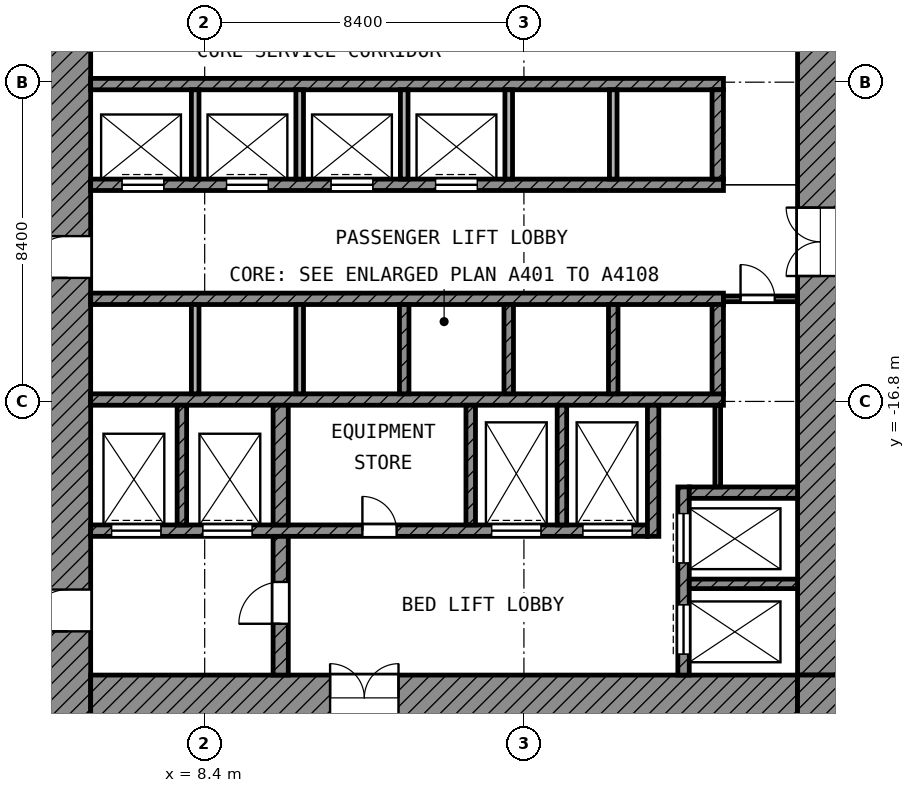
"""IFC4 building model, lengths in metres.
Left out: names, types, materials, properties, quantities, classifications, styles, units other than length and angle.
Written with IfcOpenShell. Run it as: python <this file> out.ifc"""

import sys

from ifc_helpers import new_model, si_unit, direction, frame, frame_2d, origin, place, context, subcontext, project, spatial, rectangle, extrude, element, fill, save


model = new_model("IFC4")
c1 = context("Model", 3, precision=1e-05, world=origin(), true_north=direction((0.0, 1.0)))
c2 = subcontext(c1, "Body", "Model", "MODEL_VIEW")
j1 = project(units=[si_unit("LENGTHUNIT", "METRE"), si_unit("PLANEANGLEUNIT", "RADIAN")], contexts=[c1])
p1 = place(None, origin())
s1 = spatial("IfcSite", under=j1, at=p1, CompositionType="ELEMENT")
p2 = place(p1, origin())
s2 = spatial("IfcBuilding", under=s1, at=p2, CompositionType="ELEMENT")
p3 = place(p2, frame((0.0, 0.0, 12.6)))
s3 = spatial("IfcBuildingStorey", under=s2, at=p3, CompositionType="ELEMENT", Elevation=12.6)
p4 = place(p3, frame((4.8, -25.2, 0.0), z_axis=(0.0, 0.0, 1.0), x_axis=(0.0, 1.0, 0.0)))
e1 = element("IfcWall", 1, at=p4, inside=s3, PredefinedType="SHEAR", context=c2, shape_type="SweptSolid", body=[
    extrude(rectangle(XDim=19.8, YDim=1.2, at=frame_2d((9.9, 0.0))), origin(), (0.0, 0.0, 1.0), 5.25),
])
p5 = place(p4, frame((11.65, 0.0, 0.0)))
e2 = element("IfcOpeningElement", 2, at=p5, cuts=e1, PredefinedType="OPENING", context=c2, shape_type="SweptSolid", body=[
    extrude(rectangle(XDim=1.1, YDim=2.1, at=frame_2d((0.55, 1.05))), frame((0.0, 0.61, 0.0), z_axis=(0.0, -1.0, 0.0), x_axis=(1.0, 0.0, 0.0)), (0.0, 0.0, 1.0), 1.22),
])
p6 = place(p4, frame((2.35, 0.0, 0.0)))
e3 = element("IfcOpeningElement", 3, at=p6, cuts=e1, PredefinedType="OPENING", context=c2, shape_type="SweptSolid", body=[
    extrude(rectangle(XDim=1.1, YDim=2.1, at=frame_2d((0.55, 1.05))), frame((0.0, 0.61, 0.0), z_axis=(0.0, -1.0, 0.0), x_axis=(1.0, 0.0, 0.0)), (0.0, 0.0, 1.0), 1.22),
])
p7 = place(p3, frame((24.6, -24.0, 0.0), z_axis=(0.0, 0.0, 1.0), x_axis=(0.0, 1.0, 0.0)))
e4 = element("IfcWall", 4, at=p7, inside=s3, PredefinedType="SHEAR", context=c2, shape_type="SweptSolid", body=[
    extrude(rectangle(XDim=18.6, YDim=1.2, at=frame_2d((9.3, 0.0))), origin(), (0.0, 0.0, 1.0), 5.25),
])
p8 = place(p7, frame((10.5, 0.0, 0.0)))
e5 = element("IfcOpeningElement", 5, at=p8, cuts=e4, PredefinedType="OPENING", context=c2, shape_type="SweptSolid", body=[
    extrude(rectangle(XDim=1.8, YDim=2.1, at=frame_2d((0.9, 1.05))), frame((0.0, 0.61, 0.0), z_axis=(0.0, -1.0, 0.0), x_axis=(1.0, 0.0, 0.0)), (0.0, 0.0, 1.0), 1.22),
])
p9 = place(p3, frame((5.4, -24.6, 0.0), z_axis=(0.0, 0.0, 1.0), x_axis=(1.0, 0.0, 0.0)))
e6 = element("IfcWall", 6, at=p9, inside=s3, PredefinedType="SHEAR", context=c2, shape_type="SweptSolid", body=[
    extrude(rectangle(XDim=18.6, YDim=1.2, at=frame_2d((9.3, 0.0))), origin(), (0.0, 0.0, 1.0), 5.25),
])
p10 = place(p9, frame((6.3, 0.0, 0.0)))
e7 = element("IfcOpeningElement", 7, at=p10, cuts=e6, PredefinedType="OPENING", context=c2, shape_type="SweptSolid", body=[
    extrude(rectangle(XDim=1.8, YDim=2.1, at=frame_2d((0.9, 1.05))), frame((0.0, 0.61, 0.0), z_axis=(0.0, -1.0, 0.0), x_axis=(1.0, 0.0, 0.0)), (0.0, 0.0, 1.0), 1.22),
])
p11 = place(p3, frame((24.6, -25.2, 0.0), z_axis=(0.0, 0.0, 1.0), x_axis=(0.0, 1.0, 0.0)))
e8 = element("IfcWall", 8, at=p11, inside=s3, PredefinedType="SHEAR", context=c2, shape_type="SweptSolid", body=[
    extrude(rectangle(XDim=1.2, YDim=1.2, at=frame_2d((0.6, 0.0))), origin(), (0.0, 0.0, 1.0), 5.25),
])
p12 = place(p3, frame((5.4, -8.45, 0.0), z_axis=(0.0, 0.0, 1.0), x_axis=(1.0, 0.0, 0.0)))
e9 = element("IfcWall", 9, at=p12, inside=s3, PredefinedType="SHEAR", context=c2, shape_type="SweptSolid", body=[
    extrude(rectangle(XDim=16.65, YDim=0.3, at=frame_2d((8.325, 0.0))), origin(), (0.0, 0.0, 1.0), 5.25),
])
p13 = place(p3, frame((5.4, -11.1, 0.0), z_axis=(0.0, 0.0, 1.0), x_axis=(1.0, 0.0, 0.0)))
e10 = element("IfcWall", 10, at=p13, inside=s3, PredefinedType="SHEAR", context=c2, shape_type="SweptSolid", body=[
    extrude(rectangle(XDim=16.65, YDim=0.3, at=frame_2d((8.325, 0.0))), origin(), (0.0, 0.0, 1.0), 5.25),
])
p14 = place(p13, frame((0.825, 0.0, 0.0)))
e11 = element("IfcOpeningElement", 11, at=p14, cuts=e10, PredefinedType="OPENING", context=c2, shape_type="SweptSolid", body=[
    extrude(rectangle(XDim=1.1, YDim=2.1, at=frame_2d((0.55, 1.05))), frame((0.0, 0.16, 0.0), z_axis=(0.0, -1.0, 0.0), x_axis=(1.0, 0.0, 0.0)), (0.0, 0.0, 1.0), 0.32),
])
p15 = place(p13, frame((3.575, 0.0, 0.0)))
e12 = element("IfcOpeningElement", 12, at=p15, cuts=e10, PredefinedType="OPENING", context=c2, shape_type="SweptSolid", body=[
    extrude(rectangle(XDim=1.1, YDim=2.1, at=frame_2d((0.55, 1.05))), frame((0.0, 0.16, 0.0), z_axis=(0.0, -1.0, 0.0), x_axis=(1.0, 0.0, 0.0)), (0.0, 0.0, 1.0), 0.32),
])
p16 = place(p13, frame((6.325, 0.0, 0.0)))
e13 = element("IfcOpeningElement", 13, at=p16, cuts=e10, PredefinedType="OPENING", context=c2, shape_type="SweptSolid", body=[
    extrude(rectangle(XDim=1.1, YDim=2.1, at=frame_2d((0.55, 1.05))), frame((0.0, 0.16, 0.0), z_axis=(0.0, -1.0, 0.0), x_axis=(1.0, 0.0, 0.0)), (0.0, 0.0, 1.0), 0.32),
])
p17 = place(p13, frame((9.075, 0.0, 0.0)))
e14 = element("IfcOpeningElement", 14, at=p17, cuts=e10, PredefinedType="OPENING", context=c2, shape_type="SweptSolid", body=[
    extrude(rectangle(XDim=1.1, YDim=2.1, at=frame_2d((0.55, 1.05))), frame((0.0, 0.16, 0.0), z_axis=(0.0, -1.0, 0.0), x_axis=(1.0, 0.0, 0.0)), (0.0, 0.0, 1.0), 0.32),
])
for number, where, z_axis, x_axis in (
    (15, (5.4, -14.1, 0.0), (0.0, 0.0, 1.0), (1.0, 0.0, 0.0)),
    (16, (5.4, -16.75, 0.0), (0.0, 0.0, 1.0), (1.0, 0.0, 0.0)),
):
    element("IfcWall", number, at=place(p3, frame(where, z_axis=z_axis, x_axis=x_axis)), inside=s3, PredefinedType="SHEAR", context=c2, shape_type="SweptSolid", body=[
        extrude(rectangle(XDim=16.65, YDim=0.3, at=frame_2d((8.325, 0.0))), origin(), (0.0, 0.0, 1.0), 5.25),
    ])
p18 = place(p3, frame((5.4, -20.2, 0.0), z_axis=(0.0, 0.0, 1.0), x_axis=(1.0, 0.0, 0.0)))
e17 = element("IfcWall", 17, at=p18, inside=s3, PredefinedType="SHEAR", context=c2, shape_type="SweptSolid", body=[
    extrude(rectangle(XDim=14.65, YDim=0.3, at=frame_2d((7.325, 0.0))), origin(), (0.0, 0.0, 1.0), 5.25),
])
p19 = place(p18, frame((10.55, 0.0, 0.0)))
e18 = element("IfcOpeningElement", 18, at=p19, cuts=e17, PredefinedType="OPENING", context=c2, shape_type="SweptSolid", body=[
    extrude(rectangle(XDim=1.3, YDim=2.1, at=frame_2d((0.65, 1.05))), frame((0.0, 0.16, 0.0), z_axis=(0.0, -1.0, 0.0), x_axis=(1.0, 0.0, 0.0)), (0.0, 0.0, 1.0), 0.32),
])
p20 = place(p18, frame((12.95, 0.0, 0.0)))
e19 = element("IfcOpeningElement", 19, at=p20, cuts=e17, PredefinedType="OPENING", context=c2, shape_type="SweptSolid", body=[
    extrude(rectangle(XDim=1.3, YDim=2.1, at=frame_2d((0.65, 1.05))), frame((0.0, 0.16, 0.0), z_axis=(0.0, -1.0, 0.0), x_axis=(1.0, 0.0, 0.0)), (0.0, 0.0, 1.0), 0.32),
])
p21 = place(p18, frame((0.55, 0.0, 0.0)))
e20 = element("IfcOpeningElement", 20, at=p21, cuts=e17, PredefinedType="OPENING", context=c2, shape_type="SweptSolid", body=[
    extrude(rectangle(XDim=1.3, YDim=2.1, at=frame_2d((0.65, 1.05))), frame((0.0, 0.16, 0.0), z_axis=(0.0, -1.0, 0.0), x_axis=(1.0, 0.0, 0.0)), (0.0, 0.0, 1.0), 0.32),
])
p22 = place(p18, frame((2.95, 0.0, 0.0)))
e21 = element("IfcOpeningElement", 21, at=p22, cuts=e17, PredefinedType="OPENING", context=c2, shape_type="SweptSolid", body=[
    extrude(rectangle(XDim=1.3, YDim=2.1, at=frame_2d((0.65, 1.05))), frame((0.0, 0.16, 0.0), z_axis=(0.0, -1.0, 0.0), x_axis=(1.0, 0.0, 0.0)), (0.0, 0.0, 1.0), 0.32),
])
p23 = place(p18, frame((7.15, 0.0, 0.0)))
e22 = element("IfcOpeningElement", 22, at=p23, cuts=e17, PredefinedType="OPENING", context=c2, shape_type="SweptSolid", body=[
    extrude(rectangle(XDim=0.9, YDim=2.1, at=frame_2d((0.45, 1.05))), frame((0.0, 0.16, 0.0), z_axis=(0.0, -1.0, 0.0), x_axis=(1.0, 0.0, 0.0)), (0.0, 0.0, 1.0), 0.32),
])
p24 = place(p3, frame((10.4, -24.0, 0.0), z_axis=(0.0, 0.0, 1.0), x_axis=(0.0, 1.0, 0.0)))
e23 = element("IfcWall", 23, at=p24, inside=s3, PredefinedType="SHEAR", context=c2, shape_type="SweptSolid", body=[
    extrude(rectangle(XDim=3.65, YDim=0.4, at=frame_2d((1.825, 0.0))), origin(), (0.0, 0.0, 1.0), 5.25),
])
p25 = place(p24, frame((1.35, 0.0, 0.0)))
e24 = element("IfcOpeningElement", 24, at=p25, cuts=e23, PredefinedType="OPENING", context=c2, shape_type="SweptSolid", body=[
    extrude(rectangle(XDim=1.1, YDim=2.1, at=frame_2d((0.55, 1.05))), frame((0.0, 0.21, 0.0), z_axis=(0.0, -1.0, 0.0), x_axis=(1.0, 0.0, 0.0)), (0.0, 0.0, 1.0), 0.42),
])
p26 = place(p3, frame((10.4, -20.05, 0.0), z_axis=(0.0, 0.0, 1.0), x_axis=(0.0, 1.0, 0.0)))
e25 = element("IfcWall", 25, at=p26, inside=s3, PredefinedType="SHEAR", context=c2, shape_type="SweptSolid", body=[
    extrude(rectangle(XDim=3.15, YDim=0.4, at=frame_2d((1.575, 0.0))), origin(), (0.0, 0.0, 1.0), 5.25),
])
p27 = place(p3, frame((20.2, -20.35, 0.0), z_axis=(0.0, 0.0, 1.0), x_axis=(0.0, 1.0, 0.0)))
e26 = element("IfcWall", 26, at=p27, inside=s3, PredefinedType="SHEAR", context=c2, shape_type="SweptSolid", body=[
    extrude(rectangle(XDim=3.45, YDim=0.3, at=frame_2d((1.725, 0.0))), origin(), (0.0, 0.0, 1.0), 5.25),
])
p28 = place(p3, frame((21.9, -10.95, 0.0), z_axis=(0.0, 0.0, 1.0), x_axis=(0.0, 1.0, 0.0)))
e27 = element("IfcWall", 27, at=p28, inside=s3, PredefinedType="SHEAR", context=c2, shape_type="SweptSolid", body=[
    extrude(rectangle(XDim=2.35, YDim=0.3, at=frame_2d((1.175, 0.0))), origin(), (0.0, 0.0, 1.0), 5.25),
])
p29 = place(p3, frame((21.9, -16.6, 0.0), z_axis=(0.0, 0.0, 1.0), x_axis=(0.0, 1.0, 0.0)))
e28 = element("IfcWall", 28, at=p29, inside=s3, PredefinedType="SHEAR", context=c2, shape_type="SweptSolid", body=[
    extrude(rectangle(XDim=2.35, YDim=0.3, at=frame_2d((1.175, 0.0))), origin(), (0.0, 0.0, 1.0), 5.25),
])
p30 = place(p3, frame((21.15, -19.2, 0.0), z_axis=(0.0, 0.0, 1.0), x_axis=(1.0, 0.0, 0.0)))
e29 = element("IfcWall", 29, at=p30, inside=s3, PredefinedType="SHEAR", context=c2, shape_type="SweptSolid", body=[
    extrude(rectangle(XDim=2.85, YDim=0.3, at=frame_2d((1.425, 0.0))), origin(), (0.0, 0.0, 1.0), 5.25),
])
p31 = place(p3, frame((21.0, -24.0, 0.0), z_axis=(0.0, 0.0, 1.0), x_axis=(0.0, 1.0, 0.0)))
e30 = element("IfcWall", 30, at=p31, inside=s3, PredefinedType="SHEAR", context=c2, shape_type="SweptSolid", body=[
    extrude(rectangle(XDim=4.95, YDim=0.3, at=frame_2d((2.475, 0.0))), origin(), (0.0, 0.0, 1.0), 5.25),
])
p32 = place(p31, frame((2.95, 0.0, 0.0)))
e31 = element("IfcOpeningElement", 31, at=p32, cuts=e30, PredefinedType="OPENING", context=c2, shape_type="SweptSolid", body=[
    extrude(rectangle(XDim=1.3, YDim=2.1, at=frame_2d((0.65, 1.05))), frame((0.0, 0.16, 0.0), z_axis=(0.0, -1.0, 0.0), x_axis=(1.0, 0.0, 0.0)), (0.0, 0.0, 1.0), 0.32),
])
p33 = place(p31, frame((0.55, 0.0, 0.0)))
e32 = element("IfcOpeningElement", 32, at=p33, cuts=e30, PredefinedType="OPENING", context=c2, shape_type="SweptSolid", body=[
    extrude(rectangle(XDim=1.3, YDim=2.1, at=frame_2d((0.65, 1.05))), frame((0.0, 0.16, 0.0), z_axis=(0.0, -1.0, 0.0), x_axis=(1.0, 0.0, 0.0)), (0.0, 0.0, 1.0), 0.32),
])
p34 = place(p3, frame((21.15, -21.6, 0.0), z_axis=(0.0, 0.0, 1.0), x_axis=(1.0, 0.0, 0.0)))
e33 = element("IfcWall", 33, at=p34, inside=s3, PredefinedType="SHEAR", context=c2, shape_type="SweptSolid", body=[
    extrude(rectangle(XDim=2.85, YDim=0.25, at=frame_2d((1.425, 0.0))), origin(), (0.0, 0.0, 1.0), 5.25),
])
for number, where, z_axis, x_axis in (
    (34, (7.8, -20.05, 0.0), (0.0, 0.0, 1.0), (0.0, 1.0, 0.0)),
    (35, (15.4, -20.05, 0.0), (0.0, 0.0, 1.0), (0.0, 1.0, 0.0)),
    (36, (17.8, -20.05, 0.0), (0.0, 0.0, 1.0), (0.0, 1.0, 0.0)),
):
    element("IfcWall", number, at=place(p3, frame(where, z_axis=z_axis, x_axis=x_axis)), inside=s3, PredefinedType="SHEAR", context=c2, shape_type="SweptSolid", body=[
        extrude(rectangle(XDim=3.15, YDim=0.25, at=frame_2d((1.575, 0.0))), origin(), (0.0, 0.0, 1.0), 5.25),
    ])
for number, where, z_axis, x_axis in (
    (37, (8.15, -10.95, 0.0), (0.0, 0.0, 1.0), (0.0, 1.0, 0.0)),
    (38, (10.9, -10.95, 0.0), (0.0, 0.0, 1.0), (0.0, 1.0, 0.0)),
    (39, (13.65, -10.95, 0.0), (0.0, 0.0, 1.0), (0.0, 1.0, 0.0)),
    (40, (16.4, -10.95, 0.0), (0.0, 0.0, 1.0), (0.0, 1.0, 0.0)),
    (41, (19.15, -10.95, 0.0), (0.0, 0.0, 1.0), (0.0, 1.0, 0.0)),
):
    element("IfcWall", number, at=place(p3, frame(where, z_axis=z_axis, x_axis=x_axis)), inside=s3, PredefinedType="PARTITIONING", context=c2, shape_type="SweptSolid", body=[
        extrude(rectangle(XDim=2.35, YDim=0.2, at=frame_2d((1.175, 0.0))), origin(), (0.0, 0.0, 1.0), 5.25),
    ])
for number, where, z_axis, x_axis in (
    (42, (8.15, -16.6, 0.0), (0.0, 0.0, 1.0), (0.0, 1.0, 0.0)),
    (43, (10.9, -16.6, 0.0), (0.0, 0.0, 1.0), (0.0, 1.0, 0.0)),
):
    element("IfcWall", number, at=place(p3, frame(where, z_axis=z_axis, x_axis=x_axis)), inside=s3, PredefinedType="PARTITIONING", context=c2, shape_type="SweptSolid", body=[
        extrude(rectangle(XDim=2.35, YDim=0.2, at=frame_2d((1.175, 0.0))), origin(), (0.0, 0.0, 1.0), 5.25),
    ])
for number, where, z_axis, x_axis in (
    (44, (13.65, -16.6, 0.0), (0.0, 0.0, 1.0), (0.0, 1.0, 0.0)),
    (45, (16.4, -16.6, 0.0), (0.0, 0.0, 1.0), (0.0, 1.0, 0.0)),
    (46, (19.15, -16.6, 0.0), (0.0, 0.0, 1.0), (0.0, 1.0, 0.0)),
):
    element("IfcWall", number, at=place(p3, frame(where, z_axis=z_axis, x_axis=x_axis)), inside=s3, PredefinedType="SHEAR", context=c2, shape_type="SweptSolid", body=[
        extrude(rectangle(XDim=2.35, YDim=0.25, at=frame_2d((1.175, 0.0))), origin(), (0.0, 0.0, 1.0), 5.25),
    ])
p35 = place(p3, frame((21.9, -19.05, 0.0), z_axis=(0.0, 0.0, 1.0), x_axis=(0.0, 1.0, 0.0)))
e47 = element("IfcWall", 47, at=p35, inside=s3, PredefinedType="PARTITIONING", context=c2, shape_type="SweptSolid", body=[
    extrude(rectangle(XDim=2.15, YDim=0.15, at=frame_2d((1.075, 0.0))), origin(), (0.0, 0.0, 1.0), 5.25),
])
p36 = place(p3, frame((22.05, -14.1, 0.0), z_axis=(0.0, 0.0, 1.0), x_axis=(1.0, 0.0, 0.0)))
e48 = element("IfcWall", 48, at=p36, inside=s3, PredefinedType="PARTITIONING", context=c2, shape_type="SweptSolid", body=[
    extrude(rectangle(XDim=1.95, YDim=0.15, at=frame_2d((0.975, 0.0))), origin(), (0.0, 0.0, 1.0), 5.25),
])
p37 = place(p36, frame((0.45, 0.0, 0.0)))
e49 = element("IfcOpeningElement", 49, at=p37, cuts=e48, PredefinedType="OPENING", context=c2, shape_type="SweptSolid", body=[
    extrude(rectangle(XDim=0.9, YDim=2.1, at=frame_2d((0.45, 1.05))), frame((0.0, 0.085, 0.0), z_axis=(0.0, -1.0, 0.0), x_axis=(1.0, 0.0, 0.0)), (0.0, 0.0, 1.0), 0.17),
])
p38 = place(p14, origin())
e50 = element("IfcDoor", 50, at=p38, inside=s3, OperationType="DOUBLE_DOOR_SLIDING", PredefinedType="DOOR", context=c2, shape_type="SweptSolid", body=[
    extrude(rectangle(XDim=1.1, YDim=2.1, at=frame_2d((0.55, 1.05))), frame((0.0, 0.025, 0.0), z_axis=(0.0, -1.0, 0.0), x_axis=(1.0, 0.0, 0.0)), (0.0, 0.0, 1.0), 0.05),
])
fill(e11, e50)
p39 = place(p15, origin())
e51 = element("IfcDoor", 51, at=p39, inside=s3, OperationType="DOUBLE_DOOR_SLIDING", PredefinedType="DOOR", context=c2, shape_type="SweptSolid", body=[
    extrude(rectangle(XDim=1.1, YDim=2.1, at=frame_2d((0.55, 1.05))), frame((0.0, 0.025, 0.0), z_axis=(0.0, -1.0, 0.0), x_axis=(1.0, 0.0, 0.0)), (0.0, 0.0, 1.0), 0.05),
])
fill(e12, e51)
p40 = place(p16, origin())
e52 = element("IfcDoor", 52, at=p40, inside=s3, OperationType="DOUBLE_DOOR_SLIDING", PredefinedType="DOOR", context=c2, shape_type="SweptSolid", body=[
    extrude(rectangle(XDim=1.1, YDim=2.1, at=frame_2d((0.55, 1.05))), frame((0.0, 0.025, 0.0), z_axis=(0.0, -1.0, 0.0), x_axis=(1.0, 0.0, 0.0)), (0.0, 0.0, 1.0), 0.05),
])
fill(e13, e52)
p41 = place(p17, origin())
e53 = element("IfcDoor", 53, at=p41, inside=s3, OperationType="DOUBLE_DOOR_SLIDING", PredefinedType="DOOR", context=c2, shape_type="SweptSolid", body=[
    extrude(rectangle(XDim=1.1, YDim=2.1, at=frame_2d((0.55, 1.05))), frame((0.0, 0.025, 0.0), z_axis=(0.0, -1.0, 0.0), x_axis=(1.0, 0.0, 0.0)), (0.0, 0.0, 1.0), 0.05),
])
fill(e14, e53)
p42 = place(p32, origin())
e54 = element("IfcDoor", 54, at=p42, inside=s3, OperationType="DOUBLE_DOOR_SLIDING", PredefinedType="DOOR", context=c2, shape_type="SweptSolid", body=[
    extrude(rectangle(XDim=1.3, YDim=2.1, at=frame_2d((0.65, 1.05))), frame((0.0, 0.025, 0.0), z_axis=(0.0, -1.0, 0.0), x_axis=(1.0, 0.0, 0.0)), (0.0, 0.0, 1.0), 0.05),
])
fill(e31, e54)
p43 = place(p33, origin())
e55 = element("IfcDoor", 55, at=p43, inside=s3, OperationType="DOUBLE_DOOR_SLIDING", PredefinedType="DOOR", context=c2, shape_type="SweptSolid", body=[
    extrude(rectangle(XDim=1.3, YDim=2.1, at=frame_2d((0.65, 1.05))), frame((0.0, 0.025, 0.0), z_axis=(0.0, -1.0, 0.0), x_axis=(1.0, 0.0, 0.0)), (0.0, 0.0, 1.0), 0.05),
])
fill(e32, e55)
p44 = place(p19, origin())
e56 = element("IfcDoor", 56, at=p44, inside=s3, OperationType="DOUBLE_DOOR_SLIDING", PredefinedType="DOOR", context=c2, shape_type="SweptSolid", body=[
    extrude(rectangle(XDim=1.3, YDim=2.1, at=frame_2d((0.65, 1.05))), frame((0.0, 0.025, 0.0), z_axis=(0.0, -1.0, 0.0), x_axis=(1.0, 0.0, 0.0)), (0.0, 0.0, 1.0), 0.05),
])
fill(e18, e56)
p45 = place(p20, origin())
e57 = element("IfcDoor", 57, at=p45, inside=s3, OperationType="DOUBLE_DOOR_SLIDING", PredefinedType="DOOR", context=c2, shape_type="SweptSolid", body=[
    extrude(rectangle(XDim=1.3, YDim=2.1, at=frame_2d((0.65, 1.05))), frame((0.0, 0.025, 0.0), z_axis=(0.0, -1.0, 0.0), x_axis=(1.0, 0.0, 0.0)), (0.0, 0.0, 1.0), 0.05),
])
fill(e19, e57)
p46 = place(p21, origin())
e58 = element("IfcDoor", 58, at=p46, inside=s3, OperationType="DOUBLE_DOOR_SLIDING", PredefinedType="DOOR", context=c2, shape_type="SweptSolid", body=[
    extrude(rectangle(XDim=1.3, YDim=2.1, at=frame_2d((0.65, 1.05))), frame((0.0, 0.025, 0.0), z_axis=(0.0, -1.0, 0.0), x_axis=(1.0, 0.0, 0.0)), (0.0, 0.0, 1.0), 0.05),
])
fill(e20, e58)
p47 = place(p22, origin())
e59 = element("IfcDoor", 59, at=p47, inside=s3, OperationType="DOUBLE_DOOR_SLIDING", PredefinedType="DOOR", context=c2, shape_type="SweptSolid", body=[
    extrude(rectangle(XDim=1.3, YDim=2.1, at=frame_2d((0.65, 1.05))), frame((0.0, 0.025, 0.0), z_axis=(0.0, -1.0, 0.0), x_axis=(1.0, 0.0, 0.0)), (0.0, 0.0, 1.0), 0.05),
])
fill(e21, e59)
p48 = place(p5, origin())
e60 = element("IfcDoor", 60, at=p48, inside=s3, OperationType="SINGLE_SWING_LEFT", PredefinedType="DOOR", context=c2, shape_type="SweptSolid", body=[
    extrude(rectangle(XDim=1.1, YDim=2.1, at=frame_2d((0.55, 1.05))), frame((0.0, 0.025, 0.0), z_axis=(0.0, -1.0, 0.0), x_axis=(1.0, 0.0, 0.0)), (0.0, 0.0, 1.0), 0.05),
])
fill(e2, e60)
p49 = place(p6, origin())
e61 = element("IfcDoor", 61, at=p49, inside=s3, OperationType="SINGLE_SWING_LEFT", PredefinedType="DOOR", context=c2, shape_type="SweptSolid", body=[
    extrude(rectangle(XDim=1.1, YDim=2.1, at=frame_2d((0.55, 1.05))), frame((0.0, 0.025, 0.0), z_axis=(0.0, -1.0, 0.0), x_axis=(1.0, 0.0, 0.0)), (0.0, 0.0, 1.0), 0.05),
])
fill(e3, e61)
p50 = place(p25, origin())
e62 = element("IfcDoor", 62, at=p50, inside=s3, OperationType="SINGLE_SWING_LEFT", PredefinedType="DOOR", context=c2, shape_type="SweptSolid", body=[
    extrude(rectangle(XDim=1.1, YDim=2.1, at=frame_2d((0.55, 1.05))), frame((0.0, 0.025, 0.0), z_axis=(0.0, -1.0, 0.0), x_axis=(1.0, 0.0, 0.0)), (0.0, 0.0, 1.0), 0.05),
])
fill(e24, e62)
p51 = place(p8, origin())
e63 = element("IfcDoor", 63, at=p51, inside=s3, OperationType="DOUBLE_DOOR_SINGLE_SWING", PredefinedType="DOOR", context=c2, shape_type="SweptSolid", body=[
    extrude(rectangle(XDim=1.8, YDim=2.1, at=frame_2d((0.9, 1.05))), frame((0.0, 0.025, 0.0), z_axis=(0.0, -1.0, 0.0), x_axis=(1.0, 0.0, 0.0)), (0.0, 0.0, 1.0), 0.05),
])
fill(e5, e63)
p52 = place(p10, origin())
e64 = element("IfcDoor", 64, at=p52, inside=s3, OperationType="DOUBLE_DOOR_SINGLE_SWING", PredefinedType="DOOR", context=c2, shape_type="SweptSolid", body=[
    extrude(rectangle(XDim=1.8, YDim=2.1, at=frame_2d((0.9, 1.05))), frame((0.0, 0.025, 0.0), z_axis=(0.0, -1.0, 0.0), x_axis=(1.0, 0.0, 0.0)), (0.0, 0.0, 1.0), 0.05),
])
fill(e7, e64)
p53 = place(p37, origin())
e65 = element("IfcDoor", 65, at=p53, inside=s3, OperationType="SINGLE_SWING_LEFT", PredefinedType="DOOR", context=c2, shape_type="SweptSolid", body=[
    extrude(rectangle(XDim=0.9, YDim=2.1, at=frame_2d((0.45, 1.05))), frame((0.0, 0.025, 0.0), z_axis=(0.0, -1.0, 0.0), x_axis=(1.0, 0.0, 0.0)), (0.0, 0.0, 1.0), 0.05),
])
fill(e49, e65)
p54 = place(p23, origin())
e66 = element("IfcDoor", 66, at=p54, inside=s3, OperationType="SINGLE_SWING_LEFT", PredefinedType="DOOR", context=c2, shape_type="SweptSolid", body=[
    extrude(rectangle(XDim=0.9, YDim=2.1, at=frame_2d((0.45, 1.05))), frame((0.0, 0.025, 0.0), z_axis=(0.0, -1.0, 0.0), x_axis=(1.0, 0.0, 0.0)), (0.0, 0.0, 1.0), 0.05),
])
fill(e22, e66)
save(model, sys.argv[1])
